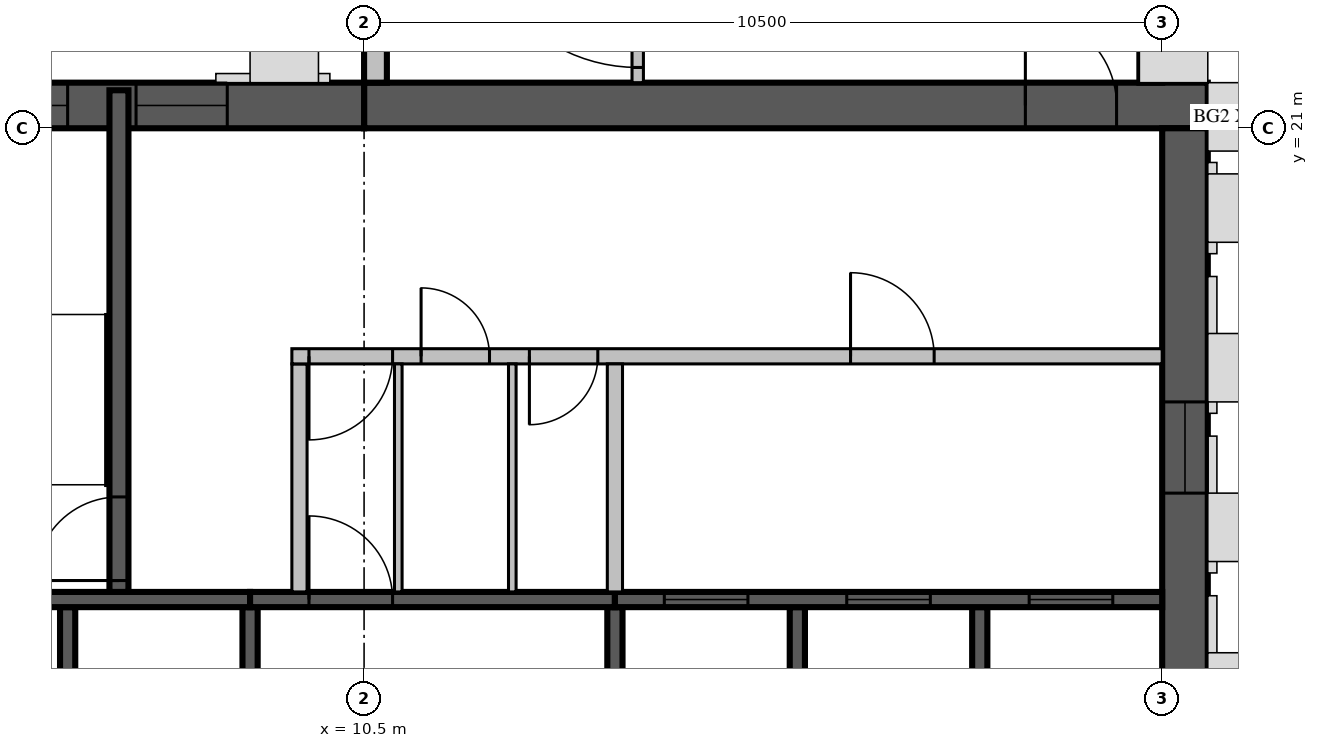
"""IFC4 building model, lengths in metres.
Left out: names, types, materials, properties, quantities, classifications, styles, units other than length and angle.
Written with IfcOpenShell. Run it as: python <this file> out.ifc"""

import sys

from ifc_helpers import new_model, si_unit, direction, frame, frame_2d, origin, place, context, subcontext, project, spatial, rectangle, extrude, source, transform, mapped, element, fill, save


model = new_model("IFC4")
c1 = context("Model", 3, precision=1e-05, world=origin(), true_north=direction((0.0, 1.0)))
c2 = subcontext(c1, "Body", "Model", "MODEL_VIEW")
j1 = project(units=[si_unit("LENGTHUNIT", "METRE"), si_unit("PLANEANGLEUNIT", "RADIAN")], contexts=[c1])
p1 = place(None, origin())
s1 = spatial("IfcSite", under=j1, at=p1, CompositionType="ELEMENT")
p2 = place(p1, origin())
s2 = spatial("IfcBuilding", under=s1, at=p2, CompositionType="ELEMENT")
p3 = place(p2, frame((0.0, 0.0, 330.0)))
s3 = spatial("IfcBuildingStorey", under=s2, at=p3, CompositionType="ELEMENT", Elevation=330.0)
m1 = source(origin(), c2, "Body", "SweptSolid", [
    extrude(rectangle(XDim=11.1, YDim=0.6, at=frame_2d((5.55, 0.0))), origin(), (0.0, 0.0, 1.0), 3.5),
])
p4 = place(p3, frame((10.5, 21.3, 0.0), z_axis=(0.0, 0.0, 1.0), x_axis=(1.0, 0.0, 0.0)))
e1 = element("IfcWall", 1, at=p4, inside=s3, PredefinedType="SHEAR", context=c2, shape_type="MappedRepresentation", body=[
    mapped(m1, transform((0.0, 0.0, 0.0), scale=1.0)),
])
m2 = source(origin(), c2, "Body", "SweptSolid", [
    extrude(rectangle(XDim=1.2, YDim=2.1, at=frame_2d((0.6, 1.05))), frame((0.0, 0.31, 0.0), z_axis=(0.0, -1.0, 0.0), x_axis=(1.0, 0.0, 0.0)), (0.0, 0.0, 1.0), 0.62),
])
p5 = place(p4, frame((8.7, 0.0, 0.0)))
e2 = element("IfcOpeningElement", 2, at=p5, cuts=e1, PredefinedType="OPENING", context=c2, shape_type="MappedRepresentation", body=[
    mapped(m2, transform((0.0, 0.0, 0.0), scale=1.0)),
])
m3 = source(origin(), c2, "Body", "SweptSolid", [
    extrude(rectangle(XDim=10.5, YDim=0.6, at=frame_2d((5.25, 0.0))), origin(), (0.0, 0.0, 1.0), 3.5),
])
p6 = place(p3, frame((21.3, 10.5, 0.0), z_axis=(0.0, 0.0, 1.0), x_axis=(0.0, 1.0, 0.0)))
e3 = element("IfcWall", 3, at=p6, inside=s3, PredefinedType="SHEAR", context=c2, shape_type="MappedRepresentation", body=[
    mapped(m3, transform((0.0, 0.0, 0.0), scale=1.0)),
])
m4 = source(origin(), c2, "Body", "SweptSolid", [
    extrude(rectangle(XDim=1.2, YDim=2.4, at=frame_2d((0.6, 1.2))), frame((0.0, 0.31, 0.0), z_axis=(0.0, -1.0, 0.0), x_axis=(1.0, 0.0, 0.0)), (0.0, 0.0, 1.0), 0.62),
])
p7 = place(p6, frame((5.7, 0.0, 0.6)))
e4 = element("IfcOpeningElement", 4, at=p7, cuts=e3, PredefinedType="OPENING", context=c2, shape_type="MappedRepresentation", body=[
    mapped(m4, transform((0.0, 0.0, 0.0), scale=1.0)),
])
m5 = source(origin(), c2, "Body", "SweptSolid", [
    extrude(rectangle(XDim=6.6, YDim=0.6, at=frame_2d((3.3, 0.0))), origin(), (0.0, 0.0, 1.0), 3.5),
])
p8 = place(p3, frame((3.9, 21.3, 0.0), z_axis=(0.0, 0.0, 1.0), x_axis=(1.0, 0.0, 0.0)))
e5 = element("IfcWall", 5, at=p8, inside=s3, PredefinedType="SHEAR", context=c2, shape_type="MappedRepresentation", body=[
    mapped(m5, transform((0.0, 0.0, 0.0), scale=1.0)),
])
p9 = place(p8, frame((1.5, 0.0, 0.6)))
e6 = element("IfcOpeningElement", 6, at=p9, cuts=e5, PredefinedType="OPENING", context=c2, shape_type="MappedRepresentation", body=[
    mapped(m4, transform((0.0, 0.0, 0.0), scale=1.0)),
])
p10 = place(p8, frame((3.6, 0.0, 0.6)))
e7 = element("IfcOpeningElement", 7, at=p10, cuts=e5, PredefinedType="OPENING", context=c2, shape_type="MappedRepresentation", body=[
    mapped(m4, transform((0.0, 0.0, 0.0), scale=1.0)),
])
m6 = source(origin(), c2, "Body", "SweptSolid", [
    extrude(rectangle(XDim=7.5, YDim=0.3, at=frame_2d((3.75, 0.0))), origin(), (0.0, 0.0, 1.0), 3.1),
])
p11 = place(p3, frame((20.85, 21.6, 0.0), z_axis=(0.0, 0.0, 1.0), x_axis=(0.0, 1.0, 0.0)))
e8 = element("IfcWall", 8, at=p11, inside=s3, PredefinedType="STANDARD", context=c2, shape_type="MappedRepresentation", body=[
    mapped(m6, transform((0.0, 0.0, 0.0), scale=1.0)),
])
m7 = source(origin(), c2, "Body", "SweptSolid", [
    extrude(rectangle(XDim=1.8, YDim=2.0, at=frame_2d((0.9, 1.0))), frame((0.0, 0.16, 0.0), z_axis=(0.0, -1.0, 0.0), x_axis=(1.0, 0.0, 0.0)), (0.0, 0.0, 1.0), 0.32),
])
p12 = place(p11, frame((0.463, 0.0, 0.6)))
e9 = element("IfcOpeningElement", 9, at=p12, cuts=e8, PredefinedType="OPENING", context=c2, shape_type="MappedRepresentation", body=[
    mapped(m7, transform((0.0, 0.0, 0.0), scale=1.0)),
])
m8 = source(origin(), c2, "Body", "SweptSolid", [
    extrude(rectangle(XDim=3.0, YDim=2.0, at=frame_2d((1.5, 1.0))), frame((0.0, 0.16, 0.0), z_axis=(0.0, -1.0, 0.0), x_axis=(1.0, 0.0, 0.0)), (0.0, 0.0, 1.0), 0.32),
])
p13 = place(p11, frame((4.2, 0.0, 0.6)))
e10 = element("IfcOpeningElement", 10, at=p13, cuts=e8, PredefinedType="OPENING", context=c2, shape_type="MappedRepresentation", body=[
    mapped(m8, transform((0.0, 0.0, 0.0), scale=1.0)),
])
p14 = place(p3, frame((10.65, 29.1, 0.0), z_axis=(0.0, 0.0, 1.0), x_axis=(0.0, -1.0, 0.0)))
e11 = element("IfcWall", 11, at=p14, inside=s3, PredefinedType="STANDARD", context=c2, shape_type="MappedRepresentation", body=[
    mapped(m6, transform((0.0, 0.0, 0.0), scale=1.0)),
])
m9 = source(origin(), c2, "Body", "SweptSolid", [
    extrude(rectangle(XDim=3.6, YDim=2.0, at=frame_2d((1.8, 1.0))), frame((0.0, 0.16, 0.0), z_axis=(0.0, -1.0, 0.0), x_axis=(1.0, 0.0, 0.0)), (0.0, 0.0, 1.0), 0.32),
])
p15 = place(p14, frame((3.36, 0.0, 0.6)))
e12 = element("IfcOpeningElement", 12, at=p15, cuts=e11, PredefinedType="OPENING", context=c2, shape_type="MappedRepresentation", body=[
    mapped(m9, transform((0.0, 0.0, 0.0), scale=1.0)),
])
m10 = source(origin(), c2, "Body", "SweptSolid", [
    extrude(rectangle(XDim=2.4, YDim=2.0, at=frame_2d((1.2, 1.0))), frame((0.0, 0.16, 0.0), z_axis=(0.0, -1.0, 0.0), x_axis=(1.0, 0.0, 0.0)), (0.0, 0.0, 1.0), 0.32),
])
p16 = place(p14, frame((0.48, 0.0, 0.6)))
e13 = element("IfcOpeningElement", 13, at=p16, cuts=e11, PredefinedType="OPENING", context=c2, shape_type="MappedRepresentation", body=[
    mapped(m10, transform((0.0, 0.0, 0.0), scale=1.0)),
])
m11 = source(origin(), c2, "Body", "SweptSolid", [
    extrude(rectangle(XDim=3.0, YDim=0.2, at=frame_2d((1.5, 0.0))), origin(), (0.0, 0.0, 1.0), 3.5),
])
p17 = place(p3, frame((6.6, 11.7, 0.0), z_axis=(0.0, 0.0, 1.0), x_axis=(0.0, 1.0, 0.0)))
e14 = element("IfcWall", 14, at=p17, inside=s3, PredefinedType="SOLIDWALL", context=c2, shape_type="MappedRepresentation", body=[
    mapped(m11, transform((0.0, 0.0, 0.0), scale=1.0)),
])
m12 = source(origin(), c2, "Body", "SweptSolid", [
    extrude(rectangle(XDim=3.0, YDim=0.2, at=frame_2d((1.5, 0.0))), origin(), (0.0, 0.0, 1.0), 3.1),
])
for number, where, z_axis, x_axis in (
    (15, (9.0, 11.7, 0.0), (0.0, 0.0, 1.0), (0.0, 1.0, 0.0)),
    (16, (13.8, 11.7, 0.0), (0.0, 0.0, 1.0), (0.0, 1.0, 0.0)),
):
    element("IfcWall", number, at=place(p3, frame(where, z_axis=z_axis, x_axis=x_axis)), inside=s3, PredefinedType="SOLIDWALL", context=c2, shape_type="MappedRepresentation", body=[
        mapped(m12, transform((0.0, 0.0, 0.0), scale=1.0)),
    ])
for number, where, z_axis, x_axis in (
    (17, (16.2, 11.7, 0.0), (0.0, 0.0, 1.0), (0.0, 1.0, 0.0)),
    (18, (18.6, 11.7, 0.0), (0.0, 0.0, 1.0), (0.0, 1.0, 0.0)),
):
    element("IfcWall", number, at=place(p3, frame(where, z_axis=z_axis, x_axis=x_axis)), inside=s3, PredefinedType="SOLIDWALL", context=c2, shape_type="MappedRepresentation", body=[
        mapped(m11, transform((0.0, 0.0, 0.0), scale=1.0)),
    ])
m13 = source(origin(), c2, "Body", "SweptSolid", [
    extrude(rectangle(XDim=4.8, YDim=0.2, at=frame_2d((2.4, 0.0))), origin(), (0.0, 0.0, 1.0), 3.5),
])
p18 = place(p3, frame((4.2, 14.8, 0.0), z_axis=(0.0, 0.0, 1.0), x_axis=(1.0, 0.0, 0.0)))
e19 = element("IfcWall", 19, at=p18, inside=s3, PredefinedType="SOLIDWALL", context=c2, shape_type="MappedRepresentation", body=[
    mapped(m13, transform((0.0, 0.0, 0.0), scale=1.0)),
])
m14 = source(origin(), c2, "Body", "SweptSolid", [
    extrude(rectangle(XDim=4.8, YDim=0.2, at=frame_2d((2.4, 0.0))), origin(), (0.0, 0.0, 1.0), 3.1),
])
p19 = place(p3, frame((9.0, 14.8, 0.0), z_axis=(0.0, 0.0, 1.0), x_axis=(1.0, 0.0, 0.0)))
e20 = element("IfcWall", 20, at=p19, inside=s3, PredefinedType="SOLIDWALL", context=c2, shape_type="MappedRepresentation", body=[
    mapped(m14, transform((0.0, 0.0, 0.0), scale=1.0)),
])
m15 = source(origin(), c2, "Body", "SweptSolid", [
    extrude(rectangle(XDim=1.1, YDim=2.1, at=frame_2d((0.55, 1.05))), frame((0.0, 0.11, 0.0), z_axis=(0.0, -1.0, 0.0), x_axis=(1.0, 0.0, 0.0)), (0.0, 0.0, 1.0), 0.22),
])
p20 = place(p19, frame((0.775, 0.0, 0.0)))
e21 = element("IfcOpeningElement", 21, at=p20, cuts=e20, PredefinedType="OPENING", context=c2, shape_type="MappedRepresentation", body=[
    mapped(m15, transform((0.0, 0.0, 0.0), scale=1.0)),
])
m16 = source(origin(), c2, "Body", "SweptSolid", [
    extrude(rectangle(XDim=7.2, YDim=0.2, at=frame_2d((3.6, 0.0))), origin(), (0.0, 0.0, 1.0), 3.5),
])
p21 = place(p3, frame((13.8, 14.8, 0.0), z_axis=(0.0, 0.0, 1.0), x_axis=(1.0, 0.0, 0.0)))
e22 = element("IfcWall", 22, at=p21, inside=s3, PredefinedType="SOLIDWALL", context=c2, shape_type="MappedRepresentation", body=[
    mapped(m16, transform((0.0, 0.0, 0.0), scale=1.0)),
])
p22 = place(p21, frame((0.65, 0.0, 0.0)))
e23 = element("IfcOpeningElement", 23, at=p22, cuts=e22, PredefinedType="OPENING", context=c2, shape_type="MappedRepresentation", body=[
    mapped(m15, transform((0.0, 0.0, 0.0), scale=1.0)),
])
p23 = place(p21, frame((3.05, 0.0, 0.0)))
e24 = element("IfcOpeningElement", 24, at=p23, cuts=e22, PredefinedType="OPENING", context=c2, shape_type="MappedRepresentation", body=[
    mapped(m15, transform((0.0, 0.0, 0.0), scale=1.0)),
])
p24 = place(p21, frame((5.45, 0.0, 0.0)))
e25 = element("IfcOpeningElement", 25, at=p24, cuts=e22, PredefinedType="OPENING", context=c2, shape_type="MappedRepresentation", body=[
    mapped(m15, transform((0.0, 0.0, 0.0), scale=1.0)),
])
m17 = source(origin(), c2, "Body", "SweptSolid", [
    extrude(rectangle(XDim=6.6, YDim=0.25, at=frame_2d((3.3, 0.0))), origin(), (0.0, 0.0, 1.0), 3.1),
])
p25 = place(p3, frame((7.275, 14.9, 0.0), z_axis=(0.0, 0.0, 1.0), x_axis=(0.0, 1.0, 0.0)))
e26 = element("IfcWall", 26, at=p25, inside=s3, PredefinedType="SOLIDWALL", context=c2, shape_type="MappedRepresentation", body=[
    mapped(m17, transform((0.0, 0.0, 0.0), scale=1.0)),
])
m18 = source(origin(), c2, "Body", "SweptSolid", [
    extrude(rectangle(XDim=1.1, YDim=2.1, at=frame_2d((0.55, 1.05))), frame((0.0, 0.135, 0.0), z_axis=(0.0, -1.0, 0.0), x_axis=(1.0, 0.0, 0.0)), (0.0, 0.0, 1.0), 0.27),
])
p26 = place(p25, frame((0.15, 0.0, 0.0)))
e27 = element("IfcOpeningElement", 27, at=p26, cuts=e26, PredefinedType="OPENING", context=c2, shape_type="MappedRepresentation", body=[
    mapped(m18, transform((0.0, 0.0, 0.0), scale=1.0)),
])
m19 = source(origin(), c2, "Body", "SweptSolid", [
    extrude(rectangle(XDim=3.0, YDim=0.2, at=frame_2d((1.5, 0.0))), origin(), (0.0, 0.0, 1.0), 3.1),
])
p27 = place(p3, frame((9.65, 14.9, 0.0), z_axis=(0.0, 0.0, 1.0), x_axis=(0.0, 1.0, 0.0)))
e28 = element("IfcWall", 28, at=p27, inside=s3, PredefinedType="PARTITIONING", context=c2, shape_type="MappedRepresentation", body=[
    mapped(m19, transform((0.0, 0.0, 0.0), scale=1.0)),
])
m20 = source(origin(), c2, "Body", "SweptSolid", [
    extrude(rectangle(XDim=11.45, YDim=0.2, at=frame_2d((5.725, 0.0))), origin(), (0.0, 0.0, 1.0), 3.1),
])
p28 = place(p3, frame((9.55, 18.0, 0.0), z_axis=(0.0, 0.0, 1.0), x_axis=(1.0, 0.0, 0.0)))
e29 = element("IfcWall", 29, at=p28, inside=s3, PredefinedType="PARTITIONING", context=c2, shape_type="MappedRepresentation", body=[
    mapped(m20, transform((0.0, 0.0, 0.0), scale=1.0)),
])
p29 = place(p28, frame((0.225, 0.0, 0.0)))
e30 = element("IfcOpeningElement", 30, at=p29, cuts=e29, PredefinedType="OPENING", context=c2, shape_type="MappedRepresentation", body=[
    mapped(m15, transform((0.0, 0.0, 0.0), scale=1.0)),
])
m21 = source(origin(), c2, "Body", "SweptSolid", [
    extrude(rectangle(XDim=0.9, YDim=2.1, at=frame_2d((0.45, 1.05))), frame((0.0, 0.11, 0.0), z_axis=(0.0, -1.0, 0.0), x_axis=(1.0, 0.0, 0.0)), (0.0, 0.0, 1.0), 0.22),
])
p30 = place(p28, frame((1.7, 0.0, 0.0)))
e31 = element("IfcOpeningElement", 31, at=p30, cuts=e29, PredefinedType="OPENING", context=c2, shape_type="MappedRepresentation", body=[
    mapped(m21, transform((0.0, 0.0, 0.0), scale=1.0)),
])
p31 = place(p28, frame((3.125, 0.0, 0.0)))
e32 = element("IfcOpeningElement", 32, at=p31, cuts=e29, PredefinedType="OPENING", context=c2, shape_type="MappedRepresentation", body=[
    mapped(m21, transform((0.0, 0.0, 0.0), scale=1.0)),
])
p32 = place(p28, frame((7.35, 0.0, 0.0)))
e33 = element("IfcOpeningElement", 33, at=p32, cuts=e29, PredefinedType="OPENING", context=c2, shape_type="MappedRepresentation", body=[
    mapped(m15, transform((0.0, 0.0, 0.0), scale=1.0)),
])
p33 = place(p3, frame((13.8, 14.9, 0.0), z_axis=(0.0, 0.0, 1.0), x_axis=(0.0, 1.0, 0.0)))
e34 = element("IfcWall", 34, at=p33, inside=s3, PredefinedType="PARTITIONING", context=c2, shape_type="MappedRepresentation", body=[
    mapped(m19, transform((0.0, 0.0, 0.0), scale=1.0)),
])
m22 = source(origin(), c2, "Body", "SweptSolid", [
    extrude(rectangle(XDim=3.0, YDim=0.1, at=frame_2d((1.5, 0.0))), origin(), (0.0, 0.0, 1.0), 3.1),
])
for number, where, z_axis, x_axis in (
    (35, (10.95, 14.9, 0.0), (0.0, 0.0, 1.0), (0.0, 1.0, 0.0)),
    (36, (12.45, 14.9, 0.0), (0.0, 0.0, 1.0), (0.0, 1.0, 0.0)),
):
    element("IfcWall", number, at=place(p3, frame(where, z_axis=z_axis, x_axis=x_axis)), inside=s3, PredefinedType="PARTITIONING", context=c2, shape_type="MappedRepresentation", body=[
        mapped(m22, transform((0.0, 0.0, 0.0), scale=1.0)),
    ])
m23 = source(origin(), c2, "Body", "SweptSolid", [
    extrude(rectangle(XDim=7.725, YDim=0.15, at=frame_2d((3.862, 0.0))), origin(), (0.0, 0.0, 1.0), 3.1),
])
p34 = place(p3, frame((14.1, 29.325, 0.0), z_axis=(0.0, 0.0, 1.0), x_axis=(0.0, -1.0, 0.0)))
e37 = element("IfcWall", 37, at=p34, inside=s3, PredefinedType="PARTITIONING", context=c2, shape_type="MappedRepresentation", body=[
    mapped(m23, transform((0.0, 0.0, 0.0), scale=1.0)),
])
m24 = source(origin(), c2, "Body", "SweptSolid", [
    extrude(rectangle(XDim=2.2, YDim=2.1, at=frame_2d((1.1, 1.05))), frame((0.0, 0.085, 0.0), z_axis=(0.0, -1.0, 0.0), x_axis=(1.0, 0.0, 0.0)), (0.0, 0.0, 1.0), 0.17),
])
p35 = place(p34, frame((5.325, 0.0, 0.0)))
e38 = element("IfcOpeningElement", 38, at=p35, cuts=e37, PredefinedType="OPENING", context=c2, shape_type="MappedRepresentation", body=[
    mapped(m24, transform((0.0, 0.0, 0.0), scale=1.0)),
])
m25 = source(origin(), c2, "Body", "SweptSolid", [
    extrude(rectangle(XDim=1.1, YDim=2.1, at=frame_2d((0.55, 1.05))), frame((0.0, 0.025, 0.0), z_axis=(0.0, -1.0, 0.0), x_axis=(1.0, 0.0, 0.0)), (0.0, 0.0, 1.0), 0.05),
])
p36 = place(p20, origin())
e39 = element("IfcDoor", 39, at=p36, inside=s3, OperationType="SINGLE_SWING_LEFT", PredefinedType="DOOR", context=c2, shape_type="MappedRepresentation", body=[
    mapped(m25, transform((0.0, 0.0, 0.0), scale=1.0)),
])
fill(e21, e39)
p37 = place(p22, origin())
e40 = element("IfcDoor", 40, at=p37, inside=s3, OperationType="SLIDING_TO_LEFT", PredefinedType="DOOR", context=c2, shape_type="MappedRepresentation", body=[
    mapped(m25, transform((0.0, 0.0, 0.0), scale=1.0)),
])
fill(e23, e40)
p38 = place(p23, origin())
e41 = element("IfcDoor", 41, at=p38, inside=s3, OperationType="SLIDING_TO_LEFT", PredefinedType="DOOR", context=c2, shape_type="MappedRepresentation", body=[
    mapped(m25, transform((0.0, 0.0, 0.0), scale=1.0)),
])
fill(e24, e41)
p39 = place(p24, origin())
e42 = element("IfcDoor", 42, at=p39, inside=s3, OperationType="SLIDING_TO_LEFT", PredefinedType="DOOR", context=c2, shape_type="MappedRepresentation", body=[
    mapped(m25, transform((0.0, 0.0, 0.0), scale=1.0)),
])
fill(e25, e42)
p40 = place(p26, origin())
e43 = element("IfcDoor", 43, at=p40, inside=s3, OperationType="SINGLE_SWING_LEFT", PredefinedType="DOOR", context=c2, shape_type="MappedRepresentation", body=[
    mapped(m25, transform((0.0, 0.0, 0.0), scale=1.0)),
])
fill(e27, e43)
p41 = place(p29, origin())
e44 = element("IfcDoor", 44, at=p41, inside=s3, OperationType="SINGLE_SWING_RIGHT", PredefinedType="DOOR", context=c2, shape_type="MappedRepresentation", body=[
    mapped(m25, transform((0.0, 0.0, 0.0), scale=1.0)),
])
fill(e30, e44)
m26 = source(origin(), c2, "Body", "SweptSolid", [
    extrude(rectangle(XDim=0.9, YDim=2.1, at=frame_2d((0.45, 1.05))), frame((0.0, 0.025, 0.0), z_axis=(0.0, -1.0, 0.0), x_axis=(1.0, 0.0, 0.0)), (0.0, 0.0, 1.0), 0.05),
])
p42 = place(p30, origin())
e45 = element("IfcDoor", 45, at=p42, inside=s3, OperationType="SINGLE_SWING_LEFT", PredefinedType="DOOR", context=c2, shape_type="MappedRepresentation", body=[
    mapped(m26, transform((0.0, 0.0, 0.0), scale=1.0)),
])
fill(e31, e45)
p43 = place(p31, origin())
e46 = element("IfcDoor", 46, at=p43, inside=s3, OperationType="SINGLE_SWING_RIGHT", PredefinedType="DOOR", context=c2, shape_type="MappedRepresentation", body=[
    mapped(m26, transform((0.0, 0.0, 0.0), scale=1.0)),
])
fill(e32, e46)
p44 = place(p32, origin())
e47 = element("IfcDoor", 47, at=p44, inside=s3, OperationType="SINGLE_SWING_LEFT", PredefinedType="DOOR", context=c2, shape_type="MappedRepresentation", body=[
    mapped(m25, transform((0.0, 0.0, 0.0), scale=1.0)),
])
fill(e33, e47)
m27 = source(origin(), c2, "Body", "SweptSolid", [
    extrude(rectangle(XDim=1.2, YDim=2.1, at=frame_2d((0.6, 1.05))), frame((0.0, 0.025, 0.0), z_axis=(0.0, -1.0, 0.0), x_axis=(1.0, 0.0, 0.0)), (0.0, 0.0, 1.0), 0.05),
])
p45 = place(p5, origin())
e48 = element("IfcDoor", 48, at=p45, inside=s3, OperationType="SINGLE_SWING_LEFT", PredefinedType="DOOR", context=c2, shape_type="MappedRepresentation", body=[
    mapped(m27, transform((0.0, 0.0, 0.0), scale=1.0)),
])
fill(e2, e48)
m28 = source(origin(), c2, "Body", "SweptSolid", [
    extrude(rectangle(XDim=1.2, YDim=2.4, at=frame_2d((0.6, 1.2))), frame((0.0, 0.03, 0.0), z_axis=(0.0, -1.0, 0.0), x_axis=(1.0, 0.0, 0.0)), (0.0, 0.0, 1.0), 0.06),
])
p46 = place(p7, origin())
e49 = element("IfcWindow", 49, at=p46, inside=s3, PartitioningType="SINGLE_PANEL", PredefinedType="WINDOW", context=c2, shape_type="MappedRepresentation", body=[
    mapped(m28, transform((0.0, 0.0, 0.0), scale=1.0)),
])
fill(e4, e49)
p47 = place(p9, origin())
e50 = element("IfcWindow", 50, at=p47, inside=s3, PartitioningType="SINGLE_PANEL", PredefinedType="WINDOW", context=c2, shape_type="MappedRepresentation", body=[
    mapped(m28, transform((0.0, 0.0, 0.0), scale=1.0)),
])
fill(e6, e50)
p48 = place(p10, origin())
e51 = element("IfcWindow", 51, at=p48, inside=s3, PartitioningType="SINGLE_PANEL", PredefinedType="WINDOW", context=c2, shape_type="MappedRepresentation", body=[
    mapped(m28, transform((0.0, 0.0, 0.0), scale=1.0)),
])
fill(e7, e51)
m29 = source(origin(), c2, "Body", "SweptSolid", [
    extrude(rectangle(XDim=2.2, YDim=2.1, at=frame_2d((1.1, 1.05))), frame((0.0, 0.025, 0.0), z_axis=(0.0, -1.0, 0.0), x_axis=(1.0, 0.0, 0.0)), (0.0, 0.0, 1.0), 0.05),
])
p49 = place(p35, origin())
e52 = element("IfcDoor", 52, at=p49, inside=s3, OperationType="DOUBLE_DOOR_SINGLE_SWING", PredefinedType="DOOR", context=c2, shape_type="MappedRepresentation", body=[
    mapped(m29, transform((0.0, 0.0, 0.0), scale=1.0)),
])
fill(e38, e52)
save(model, sys.argv[1])
